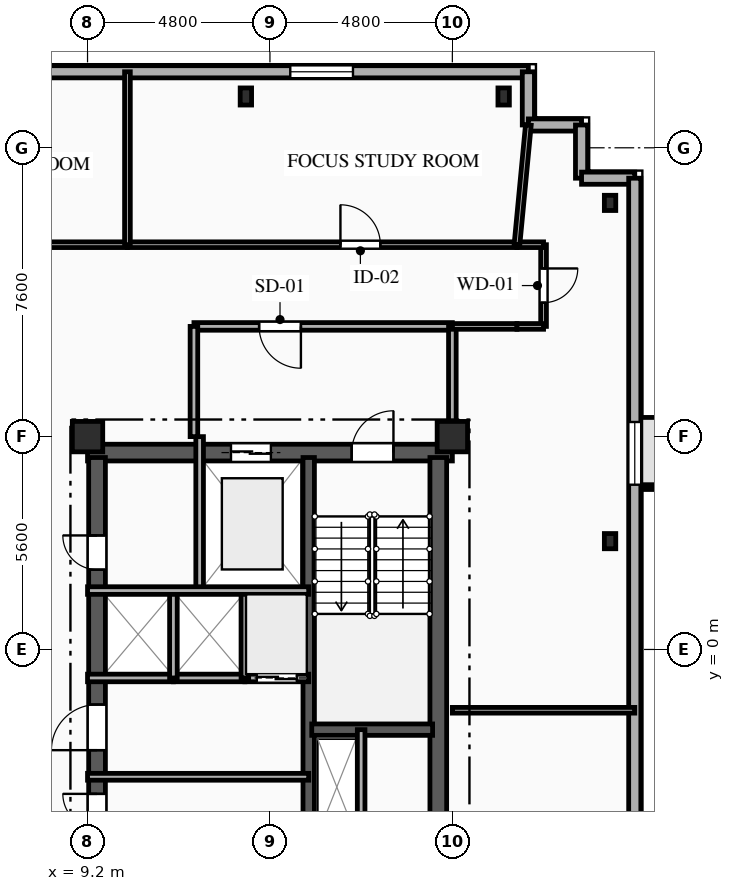
"""IFC4 building model, lengths in metres.
Left out: names, types, materials, properties, quantities, classifications, styles, units other than length and angle.
Written with IfcOpenShell. Run it as: python <this file> out.ifc"""

import sys

from ifc_helpers import new_model, si_unit, direction, frame, frame_2d, origin, origin_2d, place, context, subcontext, project, spatial, rectangle, i_section, extrude, element, fill, save


model = new_model("IFC4")
c1 = context("Model", 3, precision=1e-05, world=origin(), true_north=direction((0.0, 1.0)))
c2 = subcontext(c1, "Body", "Model", "MODEL_VIEW")
j1 = project(units=[si_unit("LENGTHUNIT", "METRE"), si_unit("PLANEANGLEUNIT", "RADIAN")], contexts=[c1])
p1 = place(None, origin())
s1 = spatial("IfcSite", under=j1, at=p1, CompositionType="ELEMENT")
p2 = place(p1, origin())
s2 = spatial("IfcBuilding", under=s1, at=p2, CompositionType="ELEMENT")
p3 = place(p2, frame((0.0, 0.0, 231.65)))
s3 = spatial("IfcBuildingStorey", under=s2, at=p3, CompositionType="ELEMENT", Elevation=231.65)
for number, where, z_axis, x_axis in (
    (1, (9.2, 5.6, 0.0), (0.0, 0.0, 1.0), (1.0, 0.0, 0.0)),
    (2, (18.8, 5.6, 0.0), (0.0, 0.0, 1.0), (1.0, 0.0, 0.0)),
):
    element("IfcColumn", number, at=place(p3, frame(where, z_axis=z_axis, x_axis=x_axis)), inside=s3, PredefinedType="COLUMN", context=c2, shape_type="SweptSolid", body=[
        extrude(rectangle(XDim=0.8, YDim=0.8, at=origin_2d()), origin(), (0.0, 0.0, 1.0), 3.35),
    ])
for number, where, z_axis, x_axis in (
    (3, (20.15, 14.55, 0.0), (0.0, 0.0, 1.0), (1.0, 0.0, 0.0)),
    (4, (13.367, 14.55, 0.0), (0.0, 0.0, 1.0), (1.0, 0.0, 0.0)),
):
    element("IfcColumn", number, at=place(p3, frame(where, z_axis=z_axis, x_axis=x_axis)), inside=s3, PredefinedType="COLUMN", context=c2, shape_type="SweptSolid", body=[
        extrude(i_section(OverallWidth=0.3, OverallDepth=0.45, WebThickness=0.014, FlangeThickness=0.026, FilletRadius=0.027, at=origin_2d()), origin(), (0.0, 0.0, 1.0), 3.35),
    ])
for number, where, z_axis, x_axis in (
    (5, (22.95, 2.85, 0.0), (0.0, 0.0, 1.0), (1.0, 0.0, 0.0)),
    (6, (22.95, 11.75, 0.0), (0.0, 0.0, 1.0), (1.0, 0.0, 0.0)),
):
    element("IfcColumn", number, at=place(p3, frame(where, z_axis=z_axis, x_axis=x_axis)), inside=s3, PredefinedType="COLUMN", context=c2, shape_type="SweptSolid", body=[
        extrude(i_section(OverallWidth=0.3, OverallDepth=0.4, WebThickness=0.013, FlangeThickness=0.024, FilletRadius=0.027, at=origin_2d()), origin(), (0.0, 0.0, 1.0), 3.35),
    ])
p4 = place(p3, frame((-21.2, 15.2, 0.0), z_axis=(0.0, 0.0, 1.0), x_axis=(1.0, 0.0, 0.0)))
e7 = element("IfcWall", 7, at=p4, inside=s3, PredefinedType="SOLIDWALL", context=c2, shape_type="SweptSolid", body=[
    extrude(rectangle(XDim=42.0, YDim=0.32, at=frame_2d((21.0, 0.0))), origin(), (0.0, 0.0, 1.0), 3.04),
])
p5 = place(p4, frame((5.015, 0.0, 0.85)))
e8 = element("IfcOpeningElement", 8, at=p5, cuts=e7, PredefinedType="OPENING", context=c2, shape_type="SweptSolid", body=[
    extrude(rectangle(XDim=1.65, YDim=1.85, at=frame_2d((0.825, 0.925))), frame((0.0, 0.17, 0.0), z_axis=(0.0, -1.0, 0.0), x_axis=(1.0, 0.0, 0.0)), (0.0, 0.0, 1.0), 0.34),
])
p6 = place(p4, frame((16.48, 0.0, 0.85)))
e9 = element("IfcOpeningElement", 9, at=p6, cuts=e7, PredefinedType="OPENING", context=c2, shape_type="SweptSolid", body=[
    extrude(rectangle(XDim=1.6, YDim=1.85, at=frame_2d((0.8, 0.925))), frame((0.0, 0.17, 0.0), z_axis=(0.0, -1.0, 0.0), x_axis=(1.0, 0.0, 0.0)), (0.0, 0.0, 1.0), 0.34),
])
p7 = place(p4, frame((25.575, 0.0, 0.85)))
e10 = element("IfcOpeningElement", 10, at=p7, cuts=e7, PredefinedType="OPENING", context=c2, shape_type="SweptSolid", body=[
    extrude(rectangle(XDim=1.65, YDim=1.85, at=frame_2d((0.825, 0.925))), frame((0.0, 0.17, 0.0), z_axis=(0.0, -1.0, 0.0), x_axis=(1.0, 0.0, 0.0)), (0.0, 0.0, 1.0), 0.34),
])
p8 = place(p4, frame((35.735, 0.0, 0.85)))
e11 = element("IfcOpeningElement", 11, at=p8, cuts=e7, PredefinedType="OPENING", context=c2, shape_type="SweptSolid", body=[
    extrude(rectangle(XDim=1.65, YDim=1.85, at=frame_2d((0.825, 0.925))), frame((0.0, 0.17, 0.0), z_axis=(0.0, -1.0, 0.0), x_axis=(1.0, 0.0, 0.0)), (0.0, 0.0, 1.0), 0.34),
])
for number, where, z_axis, x_axis in (
    (12, (20.8, 15.2, 0.0), (0.0, 0.0, 1.0), (0.0, -1.0, 0.0)),
    (13, (20.8, 13.8, 0.0), (0.0, 0.0, 1.0), (1.0, 0.0, 0.0)),
):
    element("IfcWall", number, at=place(p3, frame(where, z_axis=z_axis, x_axis=x_axis)), inside=s3, PredefinedType="SOLIDWALL", context=c2, shape_type="SweptSolid", body=[
        extrude(rectangle(XDim=1.4, YDim=0.32, at=frame_2d((0.7, 0.0))), origin(), (0.0, 0.0, 1.0), 3.04),
    ])
for number, where, z_axis, x_axis in (
    (14, (22.2, 13.8, 0.0), (0.0, 0.0, 1.0), (0.0, -1.0, 0.0)),
    (15, (22.2, 12.4, 0.0), (0.0, 0.0, 1.0), (1.0, 0.0, 0.0)),
):
    element("IfcWall", number, at=place(p3, frame(where, z_axis=z_axis, x_axis=x_axis)), inside=s3, PredefinedType="SOLIDWALL", context=c2, shape_type="SweptSolid", body=[
        extrude(rectangle(XDim=1.4, YDim=0.32, at=frame_2d((0.7, 0.0))), origin(), (0.0, 0.0, 1.0), 3.04),
    ])
p9 = place(p3, frame((23.6, 12.4, 0.0), z_axis=(0.0, 0.0, 1.0), x_axis=(0.0, -1.0, 0.0)))
e16 = element("IfcWall", 16, at=p9, inside=s3, PredefinedType="SOLIDWALL", context=c2, shape_type="SweptSolid", body=[
    extrude(rectangle(XDim=28.0, YDim=0.32, at=frame_2d((14.0, 0.0))), origin(), (0.0, 0.0, 1.0), 3.04),
])
p10 = place(p9, frame((6.415, 0.0, 0.85)))
e17 = element("IfcOpeningElement", 17, at=p10, cuts=e16, PredefinedType="OPENING", context=c2, shape_type="SweptSolid", body=[
    extrude(rectangle(XDim=1.65, YDim=1.85, at=frame_2d((0.825, 0.925))), frame((0.0, 0.17, 0.0), z_axis=(0.0, -1.0, 0.0), x_axis=(1.0, 0.0, 0.0)), (0.0, 0.0, 1.0), 0.34),
])
p11 = place(p9, frame((19.975, 0.0, 0.85)))
e18 = element("IfcOpeningElement", 18, at=p11, cuts=e16, PredefinedType="OPENING", context=c2, shape_type="SweptSolid", body=[
    extrude(rectangle(XDim=1.65, YDim=1.85, at=frame_2d((0.825, 0.925))), frame((0.0, 0.17, 0.0), z_axis=(0.0, -1.0, 0.0), x_axis=(1.0, 0.0, 0.0)), (0.0, 0.0, 1.0), 0.34),
])
p12 = place(p3, frame((9.2, 5.18, 0.0), z_axis=(0.0, 0.0, 1.0), x_axis=(1.0, 0.0, 0.0)))
e19 = element("IfcWall", 19, at=p12, inside=s3, PredefinedType="SHEAR", context=c2, shape_type="SweptSolid", body=[
    extrude(rectangle(XDim=9.6, YDim=0.44, at=frame_2d((4.8, 0.0))), origin(), (0.0, 0.0, 1.0), 3.04),
])
p13 = place(p12, frame((6.95, 0.0, 0.0)))
e20 = element("IfcOpeningElement", 20, at=p13, cuts=e19, PredefinedType="OPENING", context=c2, shape_type="SweptSolid", body=[
    extrude(rectangle(XDim=1.1, YDim=2.15, at=frame_2d((0.55, 1.075))), frame((0.0, 0.23, 0.0), z_axis=(0.0, -1.0, 0.0), x_axis=(1.0, 0.0, 0.0)), (0.0, 0.0, 1.0), 0.46),
])
p14 = place(p12, frame((3.775, 0.0, 0.0)))
e21 = element("IfcOpeningElement", 21, at=p14, cuts=e19, PredefinedType="OPENING", context=c2, shape_type="SweptSolid", body=[
    extrude(rectangle(XDim=1.05, YDim=2.1, at=frame_2d((0.525, 1.05))), frame((0.0, 0.23, 0.0), z_axis=(0.0, -1.0, 0.0), x_axis=(1.0, 0.0, 0.0)), (0.0, 0.0, 1.0), 0.46),
])
p15 = place(p3, frame((9.45, -5.05, 0.0), z_axis=(0.0, 0.0, 1.0), x_axis=(0.0, 1.0, 0.0)))
e22 = element("IfcWall", 22, at=p15, inside=s3, PredefinedType="SHEAR", context=c2, shape_type="SweptSolid", body=[
    extrude(rectangle(XDim=10.1, YDim=0.44, at=frame_2d((5.05, 0.0))), origin(), (0.0, 0.0, 1.0), 3.04),
])
p16 = place(p15, frame((7.15, 0.0, 0.0)))
e23 = element("IfcOpeningElement", 23, at=p16, cuts=e22, PredefinedType="OPENING", context=c2, shape_type="SweptSolid", body=[
    extrude(rectangle(XDim=0.9, YDim=2.1, at=frame_2d((0.45, 1.05))), frame((0.0, 0.23, 0.0), z_axis=(0.0, -1.0, 0.0), x_axis=(1.0, 0.0, 0.0)), (0.0, 0.0, 1.0), 0.46),
])
p17 = place(p15, frame((2.4, 0.0, 0.0)))
e24 = element("IfcOpeningElement", 24, at=p17, cuts=e22, PredefinedType="OPENING", context=c2, shape_type="SweptSolid", body=[
    extrude(rectangle(XDim=1.2, YDim=2.15, at=frame_2d((0.6, 1.075))), frame((0.0, 0.23, 0.0), z_axis=(0.0, -1.0, 0.0), x_axis=(1.0, 0.0, 0.0)), (0.0, 0.0, 1.0), 0.46),
])
p18 = place(p15, frame((0.35, 0.0, 0.0)))
e25 = element("IfcOpeningElement", 25, at=p18, cuts=e22, PredefinedType="OPENING", context=c2, shape_type="SweptSolid", body=[
    extrude(rectangle(XDim=0.9, YDim=2.1, at=frame_2d((0.45, 1.05))), frame((0.0, 0.23, 0.0), z_axis=(0.0, -1.0, 0.0), x_axis=(1.0, 0.0, 0.0)), (0.0, 0.0, 1.0), 0.46),
])
p19 = place(p3, frame((18.43, -5.05, 0.0), z_axis=(0.0, 0.0, 1.0), x_axis=(0.0, 1.0, 0.0)))
e26 = element("IfcWall", 26, at=p19, inside=s3, PredefinedType="SHEAR", context=c2, shape_type="SweptSolid", body=[
    extrude(rectangle(XDim=10.1, YDim=0.44, at=frame_2d((5.05, 0.0))), origin(), (0.0, 0.0, 1.0), 3.04),
])
p20 = place(p3, frame((15.02, -5.05, 0.0), z_axis=(0.0, 0.0, 1.0), x_axis=(0.0, 1.0, 0.0)))
e27 = element("IfcWall", 27, at=p20, inside=s3, PredefinedType="SHEAR", context=c2, shape_type="SweptSolid", body=[
    extrude(rectangle(XDim=10.1, YDim=0.3, at=frame_2d((5.05, 0.0))), origin(), (0.0, 0.0, 1.0), 3.04),
])
p21 = place(p3, frame((15.1, -2.11, 0.0), z_axis=(0.0, 0.0, 1.0), x_axis=(1.0, 0.0, 0.0)))
e28 = element("IfcWall", 28, at=p21, inside=s3, PredefinedType="SHEAR", context=c2, shape_type="SweptSolid", body=[
    extrude(rectangle(XDim=3.18, YDim=0.3, at=frame_2d((1.59, 0.0))), origin(), (0.0, 0.0, 1.0), 3.04),
])
p22 = place(p3, frame((16.4, -2.11, 0.0), z_axis=(0.0, 0.0, 1.0), x_axis=(0.0, -1.0, 0.0)))
e29 = element("IfcWall", 29, at=p22, inside=s3, PredefinedType="PARTITIONING", context=c2, shape_type="SweptSolid", body=[
    extrude(rectangle(XDim=3.49, YDim=0.2, at=frame_2d((1.745, 0.0))), origin(), (0.0, 0.0, 1.0), 3.04),
])
p23 = place(p3, frame((12.15, 5.6, 0.0), z_axis=(0.0, 0.0, 1.0), x_axis=(0.0, -1.0, 0.0)))
e30 = element("IfcWall", 30, at=p23, inside=s3, PredefinedType="PARTITIONING", context=c2, shape_type="SweptSolid", body=[
    extrude(rectangle(XDim=4.05, YDim=0.2, at=frame_2d((2.025, 0.0))), origin(), (0.0, 0.0, 1.0), 3.04),
])
p24 = place(p3, frame((18.8, 8.5, 0.0), z_axis=(0.0, 0.0, 1.0), x_axis=(-1.0, 0.0, 0.0)))
e31 = element("IfcWall", 31, at=p24, inside=s3, PredefinedType="PARTITIONING", context=c2, shape_type="SweptSolid", body=[
    extrude(rectangle(XDim=6.8, YDim=0.2, at=frame_2d((3.4, 0.0))), origin(), (0.0, 0.0, 1.0), 3.04),
])
p25 = place(p24, frame((3.985, 0.0, 0.0)))
e32 = element("IfcOpeningElement", 32, at=p25, cuts=e31, PredefinedType="OPENING", context=c2, shape_type="SweptSolid", body=[
    extrude(rectangle(XDim=1.1, YDim=2.15, at=frame_2d((0.55, 1.075))), frame((0.0, 0.11, 0.0), z_axis=(0.0, -1.0, 0.0), x_axis=(1.0, 0.0, 0.0)), (0.0, 0.0, 1.0), 0.22),
])
p26 = place(p3, frame((12.0, 8.5, 0.0), z_axis=(0.0, 0.0, 1.0), x_axis=(0.0, -1.0, 0.0)))
e33 = element("IfcWall", 33, at=p26, inside=s3, PredefinedType="PARTITIONING", context=c2, shape_type="SweptSolid", body=[
    extrude(rectangle(XDim=2.9, YDim=0.2, at=frame_2d((1.45, 0.0))), origin(), (0.0, 0.0, 1.0), 3.04),
])
p27 = place(p3, frame((18.8, 5.6, 0.0), z_axis=(0.0, 0.0, 1.0), x_axis=(0.0, 1.0, 0.0)))
e34 = element("IfcWall", 34, at=p27, inside=s3, PredefinedType="PARTITIONING", context=c2, shape_type="SweptSolid", body=[
    extrude(rectangle(XDim=2.9, YDim=0.2, at=frame_2d((1.45, 0.0))), origin(), (0.0, 0.0, 1.0), 2.665),
])
p28 = place(p3, frame((9.2, -3.35, 0.0), z_axis=(0.0, 0.0, 1.0), x_axis=(1.0, 0.0, 0.0)))
e35 = element("IfcWall", 35, at=p28, inside=s3, PredefinedType="PARTITIONING", context=c2, shape_type="SweptSolid", body=[
    extrude(rectangle(XDim=5.82, YDim=0.18, at=frame_2d((2.91, 0.0))), origin(), (0.0, 0.0, 1.0), 2.755),
])
p29 = place(p3, frame((11.46, -0.75, 0.0), z_axis=(0.0, 0.0, 1.0), x_axis=(-1.0, 0.0, 0.0)))
e36 = element("IfcWall", 36, at=p29, inside=s3, PredefinedType="PARTITIONING", context=c2, shape_type="SweptSolid", body=[
    extrude(rectangle(XDim=2.26, YDim=0.2, at=frame_2d((1.13, 0.0))), origin(), (0.0, 0.0, 1.0), 3.04),
])
p30 = place(p3, frame((13.34, -0.75, 0.0), z_axis=(0.0, 0.0, 1.0), x_axis=(-1.0, 0.0, 0.0)))
e37 = element("IfcWall", 37, at=p30, inside=s3, PredefinedType="PARTITIONING", context=c2, shape_type="SweptSolid", body=[
    extrude(rectangle(XDim=1.88, YDim=0.2, at=frame_2d((0.94, 0.0))), origin(), (0.0, 0.0, 1.0), 3.04),
])
p31 = place(p3, frame((15.02, -0.75, 0.0), z_axis=(0.0, 0.0, 1.0), x_axis=(-1.0, 0.0, 0.0)))
e38 = element("IfcWall", 38, at=p31, inside=s3, PredefinedType="PARTITIONING", context=c2, shape_type="SweptSolid", body=[
    extrude(rectangle(XDim=1.68, YDim=0.2, at=frame_2d((0.84, 0.0))), origin(), (0.0, 0.0, 1.0), 3.04),
])
p32 = place(p31, frame((0.315, 0.0, 0.0)))
e39 = element("IfcOpeningElement", 39, at=p32, cuts=e38, PredefinedType="OPENING", context=c2, shape_type="SweptSolid", body=[
    extrude(rectangle(XDim=1.05, YDim=2.1, at=frame_2d((0.525, 1.05))), frame((0.0, 0.11, 0.0), z_axis=(0.0, -1.0, 0.0), x_axis=(1.0, 0.0, 0.0)), (0.0, 0.0, 1.0), 0.22),
])
for number, where, z_axis, x_axis in (
    (40, (11.46, -0.75, 0.0), (0.0, 0.0, 1.0), (0.0, 1.0, 0.0)),
    (41, (13.34, -0.75, 0.0), (0.0, 0.0, 1.0), (0.0, 1.0, 0.0)),
):
    element("IfcWall", number, at=place(p3, frame(where, z_axis=z_axis, x_axis=x_axis)), inside=s3, PredefinedType="PARTITIONING", context=c2, shape_type="SweptSolid", body=[
        extrude(rectangle(XDim=2.3, YDim=0.2, at=frame_2d((1.15, 0.0))), origin(), (0.0, 0.0, 1.0), 3.04),
    ])
p33 = place(p3, frame((21.2, 10.65, 0.0), z_axis=(0.0, 0.0, 1.0), x_axis=(0.0, -1.0, 0.0)))
e42 = element("IfcWall", 42, at=p33, inside=s3, PredefinedType="PARTITIONING", context=c2, shape_type="SweptSolid", body=[
    extrude(rectangle(XDim=2.15, YDim=0.15, at=frame_2d((1.075, 0.0))), origin(), (0.0, 0.0, 1.0), 3.04),
])
p34 = place(p33, frame((0.625, 0.0, 0.0)))
e43 = element("IfcOpeningElement", 43, at=p34, cuts=e42, PredefinedType="OPENING", context=c2, shape_type="SweptSolid", body=[
    extrude(rectangle(XDim=0.9, YDim=2.1, at=frame_2d((0.45, 1.05))), frame((0.0, 0.085, 0.0), z_axis=(0.0, -1.0, 0.0), x_axis=(1.0, 0.0, 0.0)), (0.0, 0.0, 1.0), 0.17),
])
p35 = place(p3, frame((20.5, 8.5, 0.0), z_axis=(0.0, 0.0, 1.0), x_axis=(-1.0, 0.0, 0.0)))
e44 = element("IfcWall", 44, at=p35, inside=s3, PredefinedType="PARTITIONING", context=c2, shape_type="SweptSolid", body=[
    extrude(rectangle(XDim=1.7, YDim=0.15, at=frame_2d((0.85, 0.0))), origin(), (0.0, 0.0, 1.0), 3.04),
])
for number, where, z_axis, x_axis in (
    (45, (20.5, 10.65, 0.0), (0.0, 0.0, 1.0), (1.0, 0.0, 0.0)),
    (46, (21.2, 8.5, 0.0), (0.0, 0.0, 1.0), (-1.0, 0.0, 0.0)),
):
    element("IfcWall", number, at=place(p3, frame(where, z_axis=z_axis, x_axis=x_axis)), inside=s3, PredefinedType="PARTITIONING", context=c2, shape_type="SweptSolid", body=[
        extrude(rectangle(XDim=0.7, YDim=0.15, at=frame_2d((0.35, 0.0))), origin(), (0.0, 0.0, 1.0), 3.04),
    ])
p36 = place(p3, frame((0.0, 10.65, 0.0), z_axis=(0.0, 0.0, 1.0), x_axis=(1.0, 0.0, 0.0)))
e47 = element("IfcWall", 47, at=p36, inside=s3, PredefinedType="PARTITIONING", context=c2, shape_type="SweptSolid", body=[
    extrude(rectangle(XDim=10.25, YDim=0.15, at=frame_2d((5.125, 0.0))), origin(), (0.0, 0.0, 1.0), 3.04),
])
p37 = place(p36, frame((2.59, 0.0, 0.0)))
e48 = element("IfcOpeningElement", 48, at=p37, cuts=e47, PredefinedType="OPENING", context=c2, shape_type="SweptSolid", body=[
    extrude(rectangle(XDim=1.05, YDim=2.15, at=frame_2d((0.525, 1.075))), frame((0.0, 0.085, 0.0), z_axis=(0.0, -1.0, 0.0), x_axis=(1.0, 0.0, 0.0)), (0.0, 0.0, 1.0), 0.17),
])
p38 = place(p3, frame((10.25, 10.65, 0.0), z_axis=(0.0, 0.0, 1.0), x_axis=(1.0, 0.0, 0.0)))
e49 = element("IfcWall", 49, at=p38, inside=s3, PredefinedType="PARTITIONING", context=c2, shape_type="SweptSolid", body=[
    extrude(rectangle(XDim=10.25, YDim=0.15, at=frame_2d((5.125, 0.0))), origin(), (0.0, 0.0, 1.0), 3.04),
])
p39 = place(p38, frame((5.605, 0.0, 0.0)))
e50 = element("IfcOpeningElement", 50, at=p39, cuts=e49, PredefinedType="OPENING", context=c2, shape_type="SweptSolid", body=[
    extrude(rectangle(XDim=1.05, YDim=2.15, at=frame_2d((0.525, 1.075))), frame((0.0, 0.085, 0.0), z_axis=(0.0, -1.0, 0.0), x_axis=(1.0, 0.0, 0.0)), (0.0, 0.0, 1.0), 0.17),
])
p40 = place(p3, frame((18.8, -1.6, 0.0), z_axis=(0.0, 0.0, 1.0), x_axis=(1.0, 0.0, 0.0)))
e51 = element("IfcWall", 51, at=p40, inside=s3, PredefinedType="PARTITIONING", context=c2, shape_type="SweptSolid", body=[
    extrude(rectangle(XDim=4.8, YDim=0.15, at=frame_2d((2.4, 0.0))), origin(), (0.0, 0.0, 1.0), 3.04),
])
p41 = place(p3, frame((20.5, 10.65, 0.0), z_axis=(0.0, 0.0, 1.0), x_axis=(0.094820015289, 0.99549443228, 0.0)))
e52 = element("IfcWall", 52, at=p41, inside=s3, PredefinedType="PARTITIONING", context=c2, shape_type="SweptSolid", body=[
    extrude(rectangle(XDim=3.164, YDim=0.15, at=frame_2d((1.582, 0.0))), origin(), (0.0, 0.0, 1.0), 3.04),
])
p42 = place(p3, frame((10.25, 15.2, 0.0), z_axis=(0.0, 0.0, 1.0), x_axis=(0.0, -1.0, 0.0)))
e53 = element("IfcWall", 53, at=p42, inside=s3, PredefinedType="PARTITIONING", context=c2, shape_type="SweptSolid", body=[
    extrude(rectangle(XDim=4.55, YDim=0.15, at=frame_2d((2.275, 0.0))), origin(), (0.0, 0.0, 1.0), 3.04),
])
p43 = place(p3, frame((9.2, 1.55, 0.0), z_axis=(0.0, 0.0, 1.0), x_axis=(1.0, 0.0, 0.0)))
e54 = element("IfcWall", 54, at=p43, inside=s3, PredefinedType="PARTITIONING", context=c2, shape_type="SweptSolid", body=[
    extrude(rectangle(XDim=5.82, YDim=0.2, at=frame_2d((2.91, 0.0))), origin(), (0.0, 0.0, 1.0), 3.04),
])
p44 = place(p8, origin())
e55 = element("IfcWindow", 55, at=p44, inside=s3, PartitioningType="SINGLE_PANEL", PredefinedType="WINDOW", context=c2, shape_type="SweptSolid", body=[
    extrude(rectangle(XDim=1.65, YDim=1.85, at=frame_2d((0.825, 0.925))), frame((0.0, 0.03, 0.0), z_axis=(0.0, -1.0, 0.0), x_axis=(1.0, 0.0, 0.0)), (0.0, 0.0, 1.0), 0.06),
])
fill(e11, e55)
p45 = place(p10, origin())
e56 = element("IfcWindow", 56, at=p45, inside=s3, PartitioningType="SINGLE_PANEL", PredefinedType="WINDOW", context=c2, shape_type="SweptSolid", body=[
    extrude(rectangle(XDim=1.65, YDim=1.85, at=frame_2d((0.825, 0.925))), frame((0.0, 0.03, 0.0), z_axis=(0.0, -1.0, 0.0), x_axis=(1.0, 0.0, 0.0)), (0.0, 0.0, 1.0), 0.06),
])
fill(e17, e56)
p46 = place(p13, origin())
e57 = element("IfcDoor", 57, at=p46, inside=s3, OperationType="SINGLE_SWING_RIGHT", PredefinedType="DOOR", context=c2, shape_type="SweptSolid", body=[
    extrude(rectangle(XDim=1.1, YDim=2.15, at=frame_2d((0.55, 1.075))), frame((0.0, 0.025, 0.0), z_axis=(0.0, -1.0, 0.0), x_axis=(1.0, 0.0, 0.0)), (0.0, 0.0, 1.0), 0.05),
])
fill(e20, e57)
p47 = place(p14, origin())
e58 = element("IfcDoor", 58, at=p47, inside=s3, OperationType="DOUBLE_DOOR_SLIDING", PredefinedType="DOOR", context=c2, shape_type="SweptSolid", body=[
    extrude(rectangle(XDim=1.05, YDim=2.1, at=frame_2d((0.525, 1.05))), frame((0.0, 0.025, 0.0), z_axis=(0.0, -1.0, 0.0), x_axis=(1.0, 0.0, 0.0)), (0.0, 0.0, 1.0), 0.05),
])
fill(e21, e58)
p48 = place(p25, origin())
e59 = element("IfcDoor", 59, at=p48, inside=s3, OperationType="SINGLE_SWING_LEFT", PredefinedType="DOOR", context=c2, shape_type="SweptSolid", body=[
    extrude(rectangle(XDim=1.1, YDim=2.15, at=frame_2d((0.55, 1.075))), frame((0.0, 0.025, 0.0), z_axis=(0.0, -1.0, 0.0), x_axis=(1.0, 0.0, 0.0)), (0.0, 0.0, 1.0), 0.05),
])
fill(e32, e59)
p49 = place(p16, origin())
e60 = element("IfcDoor", 60, at=p49, inside=s3, OperationType="SINGLE_SWING_RIGHT", PredefinedType="DOOR", context=c2, shape_type="SweptSolid", body=[
    extrude(rectangle(XDim=0.9, YDim=2.1, at=frame_2d((0.45, 1.05))), frame((0.0, 0.025, 0.0), z_axis=(0.0, -1.0, 0.0), x_axis=(1.0, 0.0, 0.0)), (0.0, 0.0, 1.0), 0.05),
])
fill(e23, e60)
p50 = place(p32, origin())
e61 = element("IfcDoor", 61, at=p50, inside=s3, OperationType="DOUBLE_DOOR_SLIDING", PredefinedType="DOOR", context=c2, shape_type="SweptSolid", body=[
    extrude(rectangle(XDim=1.05, YDim=2.1, at=frame_2d((0.525, 1.05))), frame((0.0, 0.025, 0.0), z_axis=(0.0, -1.0, 0.0), x_axis=(1.0, 0.0, 0.0)), (0.0, 0.0, 1.0), 0.05),
])
fill(e39, e61)
p51 = place(p17, origin())
e62 = element("IfcDoor", 62, at=p51, inside=s3, OperationType="SINGLE_SWING_LEFT", PredefinedType="DOOR", context=c2, shape_type="SweptSolid", body=[
    extrude(rectangle(XDim=1.2, YDim=2.15, at=frame_2d((0.6, 1.075))), frame((0.0, 0.025, 0.0), z_axis=(0.0, -1.0, 0.0), x_axis=(1.0, 0.0, 0.0)), (0.0, 0.0, 1.0), 0.05),
])
fill(e24, e62)
p52 = place(p18, origin())
e63 = element("IfcDoor", 63, at=p52, inside=s3, OperationType="SINGLE_SWING_RIGHT", PredefinedType="DOOR", context=c2, shape_type="SweptSolid", body=[
    extrude(rectangle(XDim=0.9, YDim=2.1, at=frame_2d((0.45, 1.05))), frame((0.0, 0.025, 0.0), z_axis=(0.0, -1.0, 0.0), x_axis=(1.0, 0.0, 0.0)), (0.0, 0.0, 1.0), 0.05),
])
fill(e25, e63)
p53 = place(p34, origin())
e64 = element("IfcDoor", 64, at=p53, inside=s3, OperationType="SINGLE_SWING_LEFT", PredefinedType="DOOR", context=c2, shape_type="SweptSolid", body=[
    extrude(rectangle(XDim=0.9, YDim=2.1, at=frame_2d((0.45, 1.05))), frame((0.0, 0.025, 0.0), z_axis=(0.0, -1.0, 0.0), x_axis=(1.0, 0.0, 0.0)), (0.0, 0.0, 1.0), 0.05),
])
fill(e43, e64)
p54 = place(p39, origin())
e65 = element("IfcDoor", 65, at=p54, inside=s3, OperationType="SINGLE_SWING_LEFT", PredefinedType="DOOR", context=c2, shape_type="SweptSolid", body=[
    extrude(rectangle(XDim=1.05, YDim=2.15, at=frame_2d((0.525, 1.075))), frame((0.0, 0.025, 0.0), z_axis=(0.0, -1.0, 0.0), x_axis=(1.0, 0.0, 0.0)), (0.0, 0.0, 1.0), 0.05),
])
fill(e50, e65)
save(model, sys.argv[1])
